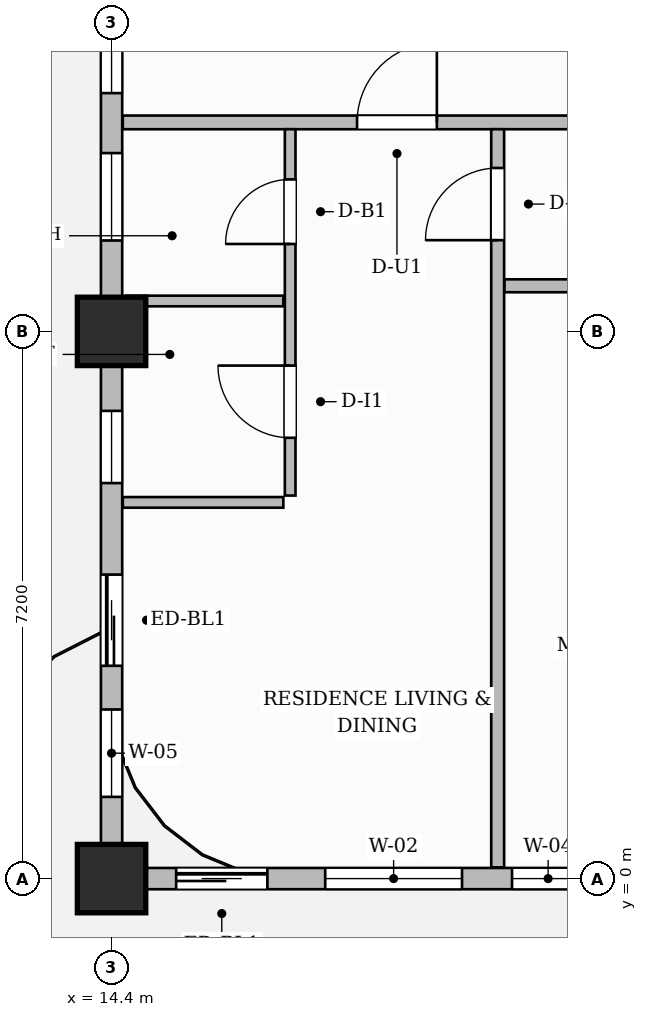
"""IFC4 building model, lengths in metres.
Left out: names, types, materials, properties, quantities, classifications, styles, units other than length and angle.
Written with IfcOpenShell. Run it as: python <this file> out.ifc"""

import sys

from ifc_helpers import new_model, si_unit, direction, frame, frame_2d, origin, origin_2d, place, context, subcontext, project, spatial, rectangle, extrude, source, transform, mapped, element, fill, save


model = new_model("IFC4")
c1 = context("Model", 3, precision=1e-05, world=origin(), true_north=direction((0.0, 1.0)))
c2 = subcontext(c1, "Body", "Model", "MODEL_VIEW")
j1 = project(units=[si_unit("LENGTHUNIT", "METRE"), si_unit("PLANEANGLEUNIT", "RADIAN")], contexts=[c1])
p1 = place(None, origin())
s1 = spatial("IfcSite", under=j1, at=p1, CompositionType="ELEMENT")
p2 = place(p1, origin())
s2 = spatial("IfcBuilding", under=s1, at=p2, CompositionType="ELEMENT")
p3 = place(p2, frame((0.0, 0.0, 205.75)))
s3 = spatial("IfcBuildingStorey", under=s2, at=p3, CompositionType="ELEMENT", Elevation=205.75)
m1 = source(origin(), c2, "Body", "SweptSolid", [
    extrude(rectangle(XDim=0.9, YDim=0.9, at=origin_2d()), origin(), (0.0, 0.0, 1.0), 3.85),
])
for number, where, z_axis, x_axis in (
    (1, (14.4, 0.0, 0.0), (0.0, 0.0, 1.0), (1.0, 0.0, 0.0)),
    (2, (14.4, 7.2, 0.0), (0.0, 0.0, 1.0), (1.0, 0.0, 0.0)),
):
    element("IfcColumn", number, at=place(p3, frame(where, z_axis=z_axis, x_axis=x_axis)), inside=s3, PredefinedType="COLUMN", context=c2, shape_type="MappedRepresentation", body=[
        mapped(m1, transform((0.0, 0.0, 0.0), scale=1.0)),
    ])
p4 = place(p3, frame((14.548, 9.95, 0.0), z_axis=(0.0, 0.0, 1.0), x_axis=(1.0, 0.0, 0.0)))
e3 = element("IfcWall", 3, at=p4, inside=s3, PredefinedType="PARTITIONING", context=c2, shape_type="SweptSolid", body=[
    extrude(rectangle(XDim=15.562, YDim=0.18, at=frame_2d((7.781, 0.0))), origin(), (0.0, 0.0, 1.0), 3.6),
])
p5 = place(p4, frame((3.082, 0.0, 0.0)))
e4 = element("IfcOpeningElement", 4, at=p5, cuts=e3, PredefinedType="OPENING", context=c2, shape_type="SweptSolid", body=[
    extrude(rectangle(XDim=1.05, YDim=2.25, at=frame_2d((0.525, 1.125))), frame((0.0, 0.1, 0.0), z_axis=(0.0, -1.0, 0.0), x_axis=(1.0, 0.0, 0.0)), (0.0, 0.0, 1.0), 0.2),
])
p6 = place(p3, frame((16.75, 5.04, 0.0), z_axis=(0.0, 0.0, 1.0), x_axis=(0.0, 1.0, 0.0)))
e5 = element("IfcWall", 5, at=p6, inside=s3, PredefinedType="PARTITIONING", context=c2, shape_type="SweptSolid", body=[
    extrude(rectangle(XDim=4.82, YDim=0.14, at=frame_2d((2.41, 0.0))), origin(), (0.0, 0.0, 1.0), 3.6),
])
p7 = place(p6, frame((0.76, 0.0, 0.0)))
e6 = element("IfcOpeningElement", 6, at=p7, cuts=e5, PredefinedType="OPENING", context=c2, shape_type="SweptSolid", body=[
    extrude(rectangle(XDim=0.95, YDim=2.15, at=frame_2d((0.475, 1.075))), frame((0.0, 0.08, 0.0), z_axis=(0.0, -1.0, 0.0), x_axis=(1.0, 0.0, 0.0)), (0.0, 0.0, 1.0), 0.16),
])
p8 = place(p6, frame((3.31, 0.0, 0.0)))
e7 = element("IfcOpeningElement", 7, at=p8, cuts=e5, PredefinedType="OPENING", context=c2, shape_type="SweptSolid", body=[
    extrude(rectangle(XDim=0.85, YDim=2.1, at=frame_2d((0.425, 1.05))), frame((0.0, 0.08, 0.0), z_axis=(0.0, -1.0, 0.0), x_axis=(1.0, 0.0, 0.0)), (0.0, 0.0, 1.0), 0.16),
])
p9 = place(p3, frame((14.59, 7.6, 0.0), z_axis=(0.0, 0.0, 1.0), x_axis=(1.0, 0.0, 0.0)))
e8 = element("IfcWall", 8, at=p9, inside=s3, PredefinedType="PARTITIONING", context=c2, shape_type="SweptSolid", body=[
    extrude(rectangle(XDim=2.07, YDim=0.14, at=frame_2d((1.035, 0.0))), origin(), (0.0, 0.0, 1.0), 3.6),
])
p10 = place(p3, frame((14.548, 4.95, 0.0), z_axis=(0.0, 0.0, 1.0), x_axis=(1.0, 0.0, 0.0)))
e9 = element("IfcWall", 9, at=p10, inside=s3, PredefinedType="PARTITIONING", context=c2, shape_type="SweptSolid", body=[
    extrude(rectangle(XDim=2.112, YDim=0.14, at=frame_2d((1.056, 0.0))), origin(), (0.0, 0.0, 1.0), 3.6),
])
p11 = place(p3, frame((19.48, 0.148, 0.0), z_axis=(0.0, 0.0, 1.0), x_axis=(0.0, 1.0, 0.0)))
e10 = element("IfcWall", 10, at=p11, inside=s3, PredefinedType="PARTITIONING", context=c2, shape_type="SweptSolid", body=[
    extrude(rectangle(XDim=9.712, YDim=0.17, at=frame_2d((4.856, 0.0))), origin(), (0.0, 0.0, 1.0), 3.6),
])
p12 = place(p11, frame((8.252, 0.0, 0.0)))
e11 = element("IfcOpeningElement", 11, at=p12, cuts=e10, PredefinedType="OPENING", context=c2, shape_type="SweptSolid", body=[
    extrude(rectangle(XDim=0.95, YDim=2.15, at=frame_2d((0.475, 1.075))), frame((0.0, 0.095, 0.0), z_axis=(0.0, -1.0, 0.0), x_axis=(1.0, 0.0, 0.0)), (0.0, 0.0, 1.0), 0.19),
])
p13 = place(p3, frame((19.57, 7.8, 0.0), z_axis=(0.0, 0.0, 1.0), x_axis=(1.0, 0.0, 0.0)))
e12 = element("IfcWall", 12, at=p13, inside=s3, PredefinedType="PARTITIONING", context=c2, shape_type="SweptSolid", body=[
    extrude(rectangle(XDim=10.54, YDim=0.17, at=frame_2d((5.27, 0.0))), origin(), (0.0, 0.0, 1.0), 3.6),
])
p14 = place(p13, frame((2.646, 0.0, 0.0)))
e13 = element("IfcOpeningElement", 13, at=p14, cuts=e12, PredefinedType="OPENING", context=c2, shape_type="SweptSolid", body=[
    extrude(rectangle(XDim=0.95, YDim=2.15, at=frame_2d((0.475, 1.075))), frame((0.0, 0.095, 0.0), z_axis=(0.0, -1.0, 0.0), x_axis=(1.0, 0.0, 0.0)), (0.0, 0.0, 1.0), 0.19),
])
p15 = place(p13, frame((4.865, 0.0, 0.0)))
e14 = element("IfcOpeningElement", 14, at=p15, cuts=e12, PredefinedType="OPENING", context=c2, shape_type="SweptSolid", body=[
    extrude(rectangle(XDim=0.95, YDim=2.15, at=frame_2d((0.475, 1.075))), frame((0.0, 0.095, 0.0), z_axis=(0.0, -1.0, 0.0), x_axis=(1.0, 0.0, 0.0)), (0.0, 0.0, 1.0), 0.19),
])
p16 = place(p13, frame((7.055, 0.0, 0.0)))
e15 = element("IfcOpeningElement", 15, at=p16, cuts=e12, PredefinedType="OPENING", context=c2, shape_type="SweptSolid", body=[
    extrude(rectangle(XDim=0.95, YDim=2.15, at=frame_2d((0.475, 1.075))), frame((0.0, 0.095, 0.0), z_axis=(0.0, -1.0, 0.0), x_axis=(1.0, 0.0, 0.0)), (0.0, 0.0, 1.0), 0.19),
])
p17 = place(p3, frame((14.4, 0.0, 0.0), z_axis=(0.0, 0.0, 1.0), x_axis=(1.0, 0.0, 0.0)))
e16 = element("IfcWall", 16, at=p17, inside=s3, PredefinedType="SOLIDWALL", context=c2, shape_type="SweptSolid", body=[
    extrude(rectangle(XDim=35.4, YDim=0.28, at=frame_2d((17.7, 0.0))), origin(), (0.0, 0.0, 1.0), 3.085),
])
p18 = place(p17, frame((0.85, 0.0, 0.0)))
e17 = element("IfcOpeningElement", 17, at=p18, cuts=e16, PredefinedType="OPENING", context=c2, shape_type="SweptSolid", body=[
    extrude(rectangle(XDim=1.2, YDim=2.2, at=frame_2d((0.6, 1.1))), frame((0.0, 0.15, 0.0), z_axis=(0.0, -1.0, 0.0), x_axis=(1.0, 0.0, 0.0)), (0.0, 0.0, 1.0), 0.3),
])
p19 = place(p17, frame((2.811, 0.0, 0.8)))
e18 = element("IfcOpeningElement", 18, at=p19, cuts=e16, PredefinedType="OPENING", context=c2, shape_type="SweptSolid", body=[
    extrude(rectangle(XDim=1.8, YDim=1.85, at=frame_2d((0.9, 0.925))), frame((0.0, 0.15, 0.0), z_axis=(0.0, -1.0, 0.0), x_axis=(1.0, 0.0, 0.0)), (0.0, 0.0, 1.0), 0.3),
])
p20 = place(p17, frame((5.269, 0.0, 0.8)))
e19 = element("IfcOpeningElement", 19, at=p20, cuts=e16, PredefinedType="OPENING", context=c2, shape_type="SweptSolid", body=[
    extrude(rectangle(XDim=0.95, YDim=1.75, at=frame_2d((0.475, 0.875))), frame((0.0, 0.15, 0.0), z_axis=(0.0, -1.0, 0.0), x_axis=(1.0, 0.0, 0.0)), (0.0, 0.0, 1.0), 0.3),
])
p21 = place(p17, frame((8.181, 0.0, 0.8)))
e20 = element("IfcOpeningElement", 20, at=p21, cuts=e16, PredefinedType="OPENING", context=c2, shape_type="SweptSolid", body=[
    extrude(rectangle(XDim=0.95, YDim=1.75, at=frame_2d((0.475, 0.875))), frame((0.0, 0.15, 0.0), z_axis=(0.0, -1.0, 0.0), x_axis=(1.0, 0.0, 0.0)), (0.0, 0.0, 1.0), 0.3),
])
p22 = place(p17, frame((9.81, 0.0, 0.8)))
e21 = element("IfcOpeningElement", 21, at=p22, cuts=e16, PredefinedType="OPENING", context=c2, shape_type="SweptSolid", body=[
    extrude(rectangle(XDim=1.4, YDim=1.85, at=frame_2d((0.7, 0.925))), frame((0.0, 0.15, 0.0), z_axis=(0.0, -1.0, 0.0), x_axis=(1.0, 0.0, 0.0)), (0.0, 0.0, 1.0), 0.3),
])
p23 = place(p17, frame((12.079, 0.0, 0.8)))
e22 = element("IfcOpeningElement", 22, at=p23, cuts=e16, PredefinedType="OPENING", context=c2, shape_type="SweptSolid", body=[
    extrude(rectangle(XDim=1.15, YDim=1.8, at=frame_2d((0.575, 0.9))), frame((0.0, 0.15, 0.0), z_axis=(0.0, -1.0, 0.0), x_axis=(1.0, 0.0, 0.0)), (0.0, 0.0, 1.0), 0.3),
])
p24 = place(p17, frame((16.804, 0.0, 0.8)))
e23 = element("IfcOpeningElement", 23, at=p24, cuts=e16, PredefinedType="OPENING", context=c2, shape_type="SweptSolid", body=[
    extrude(rectangle(XDim=1.8, YDim=1.85, at=frame_2d((0.9, 0.925))), frame((0.0, 0.15, 0.0), z_axis=(0.0, -1.0, 0.0), x_axis=(1.0, 0.0, 0.0)), (0.0, 0.0, 1.0), 0.3),
])
p25 = place(p17, frame((21.521, 0.0, 0.8)))
e24 = element("IfcOpeningElement", 24, at=p25, cuts=e16, PredefinedType="OPENING", context=c2, shape_type="SweptSolid", body=[
    extrude(rectangle(XDim=0.95, YDim=1.75, at=frame_2d((0.475, 0.875))), frame((0.0, 0.15, 0.0), z_axis=(0.0, -1.0, 0.0), x_axis=(1.0, 0.0, 0.0)), (0.0, 0.0, 1.0), 0.3),
])
p26 = place(p17, frame((23.904, 0.0, 0.8)))
e25 = element("IfcOpeningElement", 25, at=p26, cuts=e16, PredefinedType="OPENING", context=c2, shape_type="SweptSolid", body=[
    extrude(rectangle(XDim=1.8, YDim=1.85, at=frame_2d((0.9, 0.925))), frame((0.0, 0.15, 0.0), z_axis=(0.0, -1.0, 0.0), x_axis=(1.0, 0.0, 0.0)), (0.0, 0.0, 1.0), 0.3),
])
p27 = place(p17, frame((29.681, 0.0, 0.8)))
e26 = element("IfcOpeningElement", 26, at=p27, cuts=e16, PredefinedType="OPENING", context=c2, shape_type="SweptSolid", body=[
    extrude(rectangle(XDim=1.8, YDim=1.85, at=frame_2d((0.9, 0.925))), frame((0.0, 0.15, 0.0), z_axis=(0.0, -1.0, 0.0), x_axis=(1.0, 0.0, 0.0)), (0.0, 0.0, 1.0), 0.3),
])
p28 = place(p17, frame((32.327, 0.0, 0.8)))
e27 = element("IfcOpeningElement", 27, at=p28, cuts=e16, PredefinedType="OPENING", context=c2, shape_type="SweptSolid", body=[
    extrude(rectangle(XDim=1.8, YDim=1.85, at=frame_2d((0.9, 0.925))), frame((0.0, 0.15, 0.0), z_axis=(0.0, -1.0, 0.0), x_axis=(1.0, 0.0, 0.0)), (0.0, 0.0, 1.0), 0.3),
])
p29 = place(p3, frame((14.4, 0.05, 0.0), z_axis=(0.0, 0.0, 1.0), x_axis=(0.0, 1.0, 0.0)))
e28 = element("IfcWall", 28, at=p29, inside=s3, PredefinedType="SOLIDWALL", context=c2, shape_type="SweptSolid", body=[
    extrude(rectangle(XDim=25.1, YDim=0.28, at=frame_2d((12.55, 0.0))), origin(), (0.0, 0.0, 1.0), 3.085),
])
p30 = place(p29, frame((2.75, 0.0, 0.0)))
e29 = element("IfcOpeningElement", 29, at=p30, cuts=e28, PredefinedType="OPENING", context=c2, shape_type="SweptSolid", body=[
    extrude(rectangle(XDim=1.2, YDim=2.2, at=frame_2d((0.6, 1.1))), frame((0.0, 0.15, 0.0), z_axis=(0.0, -1.0, 0.0), x_axis=(1.0, 0.0, 0.0)), (0.0, 0.0, 1.0), 0.3),
])
p31 = place(p29, frame((1.025, 0.0, 0.8)))
e30 = element("IfcOpeningElement", 30, at=p31, cuts=e28, PredefinedType="OPENING", context=c2, shape_type="SweptSolid", body=[
    extrude(rectangle(XDim=1.15, YDim=1.8, at=frame_2d((0.575, 0.9))), frame((0.0, 0.15, 0.0), z_axis=(0.0, -1.0, 0.0), x_axis=(1.0, 0.0, 0.0)), (0.0, 0.0, 1.0), 0.3),
])
p32 = place(p29, frame((5.154, 0.0, 0.8)))
e31 = element("IfcOpeningElement", 31, at=p32, cuts=e28, PredefinedType="OPENING", context=c2, shape_type="SweptSolid", body=[
    extrude(rectangle(XDim=0.95, YDim=1.75, at=frame_2d((0.475, 0.875))), frame((0.0, 0.15, 0.0), z_axis=(0.0, -1.0, 0.0), x_axis=(1.0, 0.0, 0.0)), (0.0, 0.0, 1.0), 0.3),
])
p33 = place(p29, frame((8.346, 0.0, 0.8)))
e32 = element("IfcOpeningElement", 32, at=p33, cuts=e28, PredefinedType="OPENING", context=c2, shape_type="SweptSolid", body=[
    extrude(rectangle(XDim=1.15, YDim=1.8, at=frame_2d((0.575, 0.9))), frame((0.0, 0.15, 0.0), z_axis=(0.0, -1.0, 0.0), x_axis=(1.0, 0.0, 0.0)), (0.0, 0.0, 1.0), 0.3),
])
p34 = place(p29, frame((10.285, 0.0, 0.8)))
e33 = element("IfcOpeningElement", 33, at=p34, cuts=e28, PredefinedType="OPENING", context=c2, shape_type="SweptSolid", body=[
    extrude(rectangle(XDim=1.15, YDim=1.8, at=frame_2d((0.575, 0.9))), frame((0.0, 0.15, 0.0), z_axis=(0.0, -1.0, 0.0), x_axis=(1.0, 0.0, 0.0)), (0.0, 0.0, 1.0), 0.3),
])
p35 = place(p29, frame((12.114, 0.0, 0.8)))
e34 = element("IfcOpeningElement", 34, at=p35, cuts=e28, PredefinedType="OPENING", context=c2, shape_type="SweptSolid", body=[
    extrude(rectangle(XDim=1.15, YDim=1.8, at=frame_2d((0.575, 0.9))), frame((0.0, 0.15, 0.0), z_axis=(0.0, -1.0, 0.0), x_axis=(1.0, 0.0, 0.0)), (0.0, 0.0, 1.0), 0.3),
])
p36 = place(p29, frame((15.675, 0.0, 0.8)))
e35 = element("IfcOpeningElement", 35, at=p36, cuts=e28, PredefinedType="OPENING", context=c2, shape_type="SweptSolid", body=[
    extrude(rectangle(XDim=1.8, YDim=1.85, at=frame_2d((0.9, 0.925))), frame((0.0, 0.15, 0.0), z_axis=(0.0, -1.0, 0.0), x_axis=(1.0, 0.0, 0.0)), (0.0, 0.0, 1.0), 0.3),
])
p37 = place(p29, frame((18.425, 0.0, 0.8)))
e36 = element("IfcOpeningElement", 36, at=p37, cuts=e28, PredefinedType="OPENING", context=c2, shape_type="SweptSolid", body=[
    extrude(rectangle(XDim=1.8, YDim=1.85, at=frame_2d((0.9, 0.925))), frame((0.0, 0.15, 0.0), z_axis=(0.0, -1.0, 0.0), x_axis=(1.0, 0.0, 0.0)), (0.0, 0.0, 1.0), 0.3),
])
p38 = place(p29, frame((22.65, 0.0, 0.8)))
e37 = element("IfcOpeningElement", 37, at=p38, cuts=e28, PredefinedType="OPENING", context=c2, shape_type="SweptSolid", body=[
    extrude(rectangle(XDim=1.4, YDim=1.85, at=frame_2d((0.7, 0.925))), frame((0.0, 0.15, 0.0), z_axis=(0.0, -1.0, 0.0), x_axis=(1.0, 0.0, 0.0)), (0.0, 0.0, 1.0), 0.3),
])
m2 = source(origin(), c2, "Body", "SweptSolid", [
    extrude(rectangle(XDim=0.95, YDim=2.15, at=frame_2d((0.475, 1.075))), frame((0.0, 0.025, 0.0), z_axis=(0.0, -1.0, 0.0), x_axis=(1.0, 0.0, 0.0)), (0.0, 0.0, 1.0), 0.05),
])
p39 = place(p7, origin())
e38 = element("IfcDoor", 38, at=p39, inside=s3, OperationType="SINGLE_SWING_RIGHT", PredefinedType="DOOR", context=c2, shape_type="MappedRepresentation", body=[
    mapped(m2, transform((0.0, 0.0, 0.0), scale=1.0)),
])
fill(e6, e38)
m3 = source(origin(), c2, "Body", "SweptSolid", [
    extrude(rectangle(XDim=0.85, YDim=2.1, at=frame_2d((0.425, 1.05))), frame((0.0, 0.025, 0.0), z_axis=(0.0, -1.0, 0.0), x_axis=(1.0, 0.0, 0.0)), (0.0, 0.0, 1.0), 0.05),
])
p40 = place(p8, origin())
e39 = element("IfcDoor", 39, at=p40, inside=s3, OperationType="SINGLE_SWING_LEFT", PredefinedType="DOOR", context=c2, shape_type="MappedRepresentation", body=[
    mapped(m3, transform((0.0, 0.0, 0.0), scale=1.0)),
])
fill(e7, e39)
m4 = source(origin(), c2, "Body", "SweptSolid", [
    extrude(rectangle(XDim=1.05, YDim=2.25, at=frame_2d((0.525, 1.125))), frame((0.0, 0.025, 0.0), z_axis=(0.0, -1.0, 0.0), x_axis=(1.0, 0.0, 0.0)), (0.0, 0.0, 1.0), 0.05),
])
p41 = place(p5, origin())
e40 = element("IfcDoor", 40, at=p41, inside=s3, OperationType="SINGLE_SWING_RIGHT", PredefinedType="DOOR", context=c2, shape_type="MappedRepresentation", body=[
    mapped(m4, transform((0.0, 0.0, 0.0), scale=1.0)),
])
fill(e4, e40)
p42 = place(p12, origin())
e41 = element("IfcDoor", 41, at=p42, inside=s3, OperationType="SINGLE_SWING_LEFT", PredefinedType="DOOR", context=c2, shape_type="MappedRepresentation", body=[
    mapped(m2, transform((0.0, 0.0, 0.0), scale=1.0)),
])
fill(e11, e41)
m5 = source(origin(), c2, "Body", "SweptSolid", [
    extrude(rectangle(XDim=1.2, YDim=2.2, at=frame_2d((0.6, 1.1))), frame((0.0, 0.025, 0.0), z_axis=(0.0, -1.0, 0.0), x_axis=(1.0, 0.0, 0.0)), (0.0, 0.0, 1.0), 0.05),
])
p43 = place(p18, origin())
e42 = element("IfcDoor", 42, at=p43, inside=s3, OperationType="SLIDING_TO_LEFT", PredefinedType="DOOR", context=c2, shape_type="MappedRepresentation", body=[
    mapped(m5, transform((0.0, 0.0, 0.0), scale=1.0)),
])
fill(e17, e42)
p44 = place(p30, origin())
e43 = element("IfcDoor", 43, at=p44, inside=s3, OperationType="SLIDING_TO_LEFT", PredefinedType="DOOR", context=c2, shape_type="MappedRepresentation", body=[
    mapped(m5, transform((0.0, 0.0, 0.0), scale=1.0)),
])
fill(e29, e43)
m6 = source(origin(), c2, "Body", "SweptSolid", [
    extrude(rectangle(XDim=1.8, YDim=1.85, at=frame_2d((0.9, 0.925))), frame((0.0, 0.03, 0.0), z_axis=(0.0, -1.0, 0.0), x_axis=(1.0, 0.0, 0.0)), (0.0, 0.0, 1.0), 0.06),
])
p45 = place(p19, origin())
e44 = element("IfcWindow", 44, at=p45, inside=s3, PartitioningType="DOUBLE_PANEL_VERTICAL", PredefinedType="WINDOW", context=c2, shape_type="MappedRepresentation", body=[
    mapped(m6, transform((0.0, 0.0, 0.0), scale=1.0)),
])
fill(e18, e44)
m7 = source(origin(), c2, "Body", "SweptSolid", [
    extrude(rectangle(XDim=0.95, YDim=1.75, at=frame_2d((0.475, 0.875))), frame((0.0, 0.03, 0.0), z_axis=(0.0, -1.0, 0.0), x_axis=(1.0, 0.0, 0.0)), (0.0, 0.0, 1.0), 0.06),
])
p46 = place(p20, origin())
e45 = element("IfcWindow", 45, at=p46, inside=s3, PartitioningType="SINGLE_PANEL", PredefinedType="WINDOW", context=c2, shape_type="MappedRepresentation", body=[
    mapped(m7, transform((0.0, 0.0, 0.0), scale=1.0)),
])
fill(e19, e45)
m8 = source(origin(), c2, "Body", "SweptSolid", [
    extrude(rectangle(XDim=1.15, YDim=1.8, at=frame_2d((0.575, 0.9))), frame((0.0, 0.03, 0.0), z_axis=(0.0, -1.0, 0.0), x_axis=(1.0, 0.0, 0.0)), (0.0, 0.0, 1.0), 0.06),
])
p47 = place(p31, origin())
e46 = element("IfcWindow", 46, at=p47, inside=s3, PartitioningType="SINGLE_PANEL", PredefinedType="WINDOW", context=c2, shape_type="MappedRepresentation", body=[
    mapped(m8, transform((0.0, 0.0, 0.0), scale=1.0)),
])
fill(e30, e46)
p48 = place(p32, origin())
e47 = element("IfcWindow", 47, at=p48, inside=s3, PartitioningType="SINGLE_PANEL", PredefinedType="WINDOW", context=c2, shape_type="MappedRepresentation", body=[
    mapped(m7, transform((0.0, 0.0, 0.0), scale=1.0)),
])
fill(e31, e47)
p49 = place(p33, origin())
e48 = element("IfcWindow", 48, at=p49, inside=s3, PartitioningType="SINGLE_PANEL", PredefinedType="WINDOW", context=c2, shape_type="MappedRepresentation", body=[
    mapped(m8, transform((0.0, 0.0, 0.0), scale=1.0)),
])
fill(e32, e48)
p50 = place(p34, origin())
e49 = element("IfcWindow", 49, at=p50, inside=s3, PartitioningType="SINGLE_PANEL", PredefinedType="WINDOW", context=c2, shape_type="MappedRepresentation", body=[
    mapped(m8, transform((0.0, 0.0, 0.0), scale=1.0)),
])
fill(e33, e49)
save(model, sys.argv[1])
